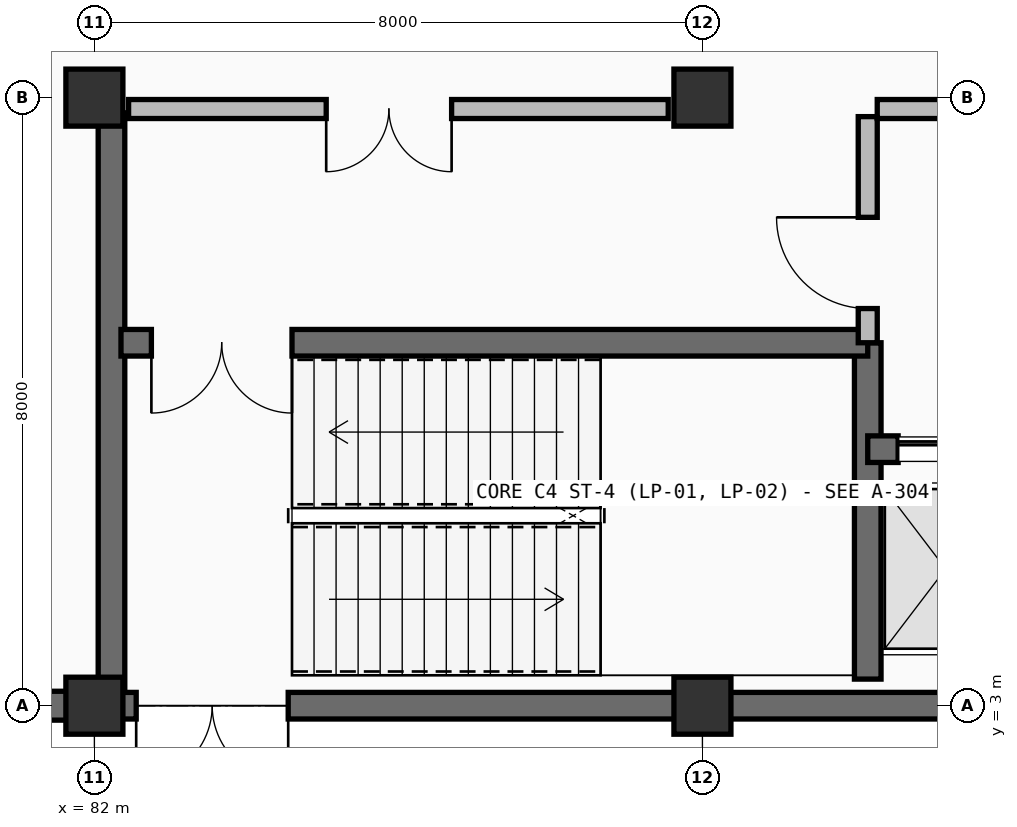
"""IFC4 building model, lengths in metres.
Left out: names, types, materials, properties, quantities, classifications, styles, units other than length and angle.
Written with IfcOpenShell. Run it as: python <this file> out.ifc"""

import sys

from ifc_helpers import new_model, si_unit, direction, frame, frame_2d, origin, origin_2d, place, context, subcontext, project, spatial, rectangle, extrude, element, fill, save


model = new_model("IFC4")
c1 = context("Model", 3, precision=1e-05, world=origin(), true_north=direction((0.0, 1.0)))
c2 = subcontext(c1, "Body", "Model", "MODEL_VIEW")
j1 = project(units=[si_unit("LENGTHUNIT", "METRE"), si_unit("PLANEANGLEUNIT", "RADIAN")], contexts=[c1])
p1 = place(None, origin())
s1 = spatial("IfcSite", under=j1, at=p1, CompositionType="ELEMENT")
p2 = place(p1, origin())
s2 = spatial("IfcBuilding", under=s1, at=p2, CompositionType="ELEMENT")
p3 = place(p2, origin())
s3 = spatial("IfcBuildingStorey", under=s2, at=p3, CompositionType="ELEMENT", Elevation=0.0)
for number, where, z_axis, x_axis in (
    (1, (82.0, 3.0, 0.0), (0.0, 0.0, 1.0), (1.0, 0.0, 0.0)),
    (2, (82.0, 11.0, 0.0), (0.0, 0.0, 1.0), (1.0, 0.0, 0.0)),
    (3, (90.0, 3.0, 0.0), (0.0, 0.0, 1.0), (1.0, 0.0, 0.0)),
    (4, (90.0, 11.0, 0.0), (0.0, 0.0, 1.0), (1.0, 0.0, 0.0)),
):
    element("IfcColumn", number, at=place(p3, frame(where, z_axis=z_axis, x_axis=x_axis)), inside=s3, PredefinedType="COLUMN", context=c2, shape_type="SweptSolid", body=[
        extrude(rectangle(XDim=0.75, YDim=0.75, at=origin_2d()), origin(), (0.0, 0.0, 1.0), 5.4),
    ])
p4 = place(p3, frame((98.0, 3.0, 0.0), z_axis=(0.0, 0.0, 1.0), x_axis=(-1.0, 0.0, 0.0)))
e5 = element("IfcWall", 5, at=p4, inside=s3, PredefinedType="SHEAR", context=c2, shape_type="SweptSolid", body=[
    extrude(rectangle(XDim=8.0, YDim=0.35, at=frame_2d((4.0, 0.0))), origin(), (0.0, 0.0, 1.0), 5.4),
])
p5 = place(p3, frame((90.0, 3.0, 0.0), z_axis=(0.0, 0.0, 1.0), x_axis=(-1.0, 0.0, 0.0)))
e6 = element("IfcWall", 6, at=p5, inside=s3, PredefinedType="SHEAR", context=c2, shape_type="SweptSolid", body=[
    extrude(rectangle(XDim=8.0, YDim=0.35, at=frame_2d((4.0, 0.0))), origin(), (0.0, 0.0, 1.0), 5.4),
])
p6 = place(p5, frame((5.45, 0.0, 0.0)))
e7 = element("IfcOpeningElement", 7, at=p6, cuts=e6, PredefinedType="OPENING", context=c2, shape_type="SweptSolid", body=[
    extrude(rectangle(XDim=2.0, YDim=2.6, at=frame_2d((1.0, 1.3))), frame((0.0, 0.185, 0.0), z_axis=(0.0, -1.0, 0.0), x_axis=(1.0, 0.0, 0.0)), (0.0, 0.0, 1.0), 0.37),
])
p7 = place(p3, frame((82.0, 3.0, 0.0), z_axis=(0.0, 0.0, 1.0), x_axis=(-1.0, 0.0, 0.0)))
e8 = element("IfcWall", 8, at=p7, inside=s3, PredefinedType="SOLIDWALL", context=c2, shape_type="SweptSolid", body=[
    extrude(rectangle(XDim=7.0, YDim=0.38, at=frame_2d((3.5, 0.0))), origin(), (0.0, 0.0, 1.0), 5.4),
])
p8 = place(p7, frame((2.4, 0.0, 0.0)))
e9 = element("IfcOpeningElement", 9, at=p8, cuts=e8, PredefinedType="OPENING", context=c2, shape_type="SweptSolid", body=[
    extrude(rectangle(XDim=2.2, YDim=2.8, at=frame_2d((1.1, 1.4))), frame((0.0, 0.2, 0.0), z_axis=(0.0, -1.0, 0.0), x_axis=(1.0, 0.0, 0.0)), (0.0, 0.0, 1.0), 0.4),
])
p9 = place(p3, frame((82.225, 3.2, 0.0), z_axis=(0.0, 0.0, 1.0), x_axis=(0.0, 1.0, 0.0)))
e10 = element("IfcWall", 10, at=p9, inside=s3, PredefinedType="SHEAR", context=c2, shape_type="SweptSolid", body=[
    extrude(rectangle(XDim=7.6, YDim=0.35, at=frame_2d((3.8, 0.0))), origin(), (0.0, 0.0, 1.0), 5.1),
])
p10 = place(p3, frame((92.175, 3.35, 0.0), z_axis=(0.0, 0.0, 1.0), x_axis=(0.0, 1.0, 0.0)))
e11 = element("IfcWall", 11, at=p10, inside=s3, PredefinedType="SHEAR", context=c2, shape_type="SweptSolid", body=[
    extrude(rectangle(XDim=4.425, YDim=0.35, at=frame_2d((2.212, 0.0))), origin(), (0.0, 0.0, 1.0), 5.1),
])
p11 = place(p3, frame((82.35, 7.775, 0.0), z_axis=(0.0, 0.0, 1.0), x_axis=(1.0, 0.0, 0.0)))
e12 = element("IfcWall", 12, at=p11, inside=s3, PredefinedType="SHEAR", context=c2, shape_type="SweptSolid", body=[
    extrude(rectangle(XDim=9.825, YDim=0.35, at=frame_2d((4.913, 0.0))), origin(), (0.0, 0.0, 1.0), 5.1),
])
p12 = place(p11, frame((0.4, 0.0, 0.0)))
e13 = element("IfcOpeningElement", 13, at=p12, cuts=e12, PredefinedType="OPENING", context=c2, shape_type="SweptSolid", body=[
    extrude(rectangle(XDim=1.85, YDim=2.25, at=frame_2d((0.925, 1.125))), frame((0.0, 0.185, 0.0), z_axis=(0.0, -1.0, 0.0), x_axis=(1.0, 0.0, 0.0)), (0.0, 0.0, 1.0), 0.37),
])
p13 = place(p3, frame((92.175, 6.375, 0.0), z_axis=(0.0, 0.0, 1.0), x_axis=(1.0, 0.0, 0.0)))
e14 = element("IfcWall", 14, at=p13, inside=s3, PredefinedType="SHEAR", context=c2, shape_type="SweptSolid", body=[
    extrude(rectangle(XDim=5.475, YDim=0.35, at=frame_2d((2.737, 0.0))), origin(), (0.0, 0.0, 1.0), 5.1),
])
p14 = place(p13, frame((0.4, 0.0, 0.0)))
e15 = element("IfcOpeningElement", 15, at=p14, cuts=e14, PredefinedType="OPENING", context=c2, shape_type="SweptSolid", body=[
    extrude(rectangle(XDim=1.25, YDim=2.25, at=frame_2d((0.625, 1.125))), frame((0.0, 0.185, 0.0), z_axis=(0.0, -1.0, 0.0), x_axis=(1.0, 0.0, 0.0)), (0.0, 0.0, 1.0), 0.37),
])
p15 = place(p13, frame((3.275, 0.0, 0.0)))
e16 = element("IfcOpeningElement", 16, at=p15, cuts=e14, PredefinedType="OPENING", context=c2, shape_type="SweptSolid", body=[
    extrude(rectangle(XDim=1.1, YDim=2.2, at=frame_2d((0.55, 1.1))), frame((0.0, 0.185, 0.0), z_axis=(0.0, -1.0, 0.0), x_axis=(1.0, 0.0, 0.0)), (0.0, 0.0, 1.0), 0.37),
])
p16 = place(p3, frame((92.175, 7.775, 0.0), z_axis=(0.0, 0.0, 1.0), x_axis=(0.0, 1.0, 0.0)))
e17 = element("IfcWall", 17, at=p16, inside=s3, PredefinedType="PARTITIONING", context=c2, shape_type="SweptSolid", body=[
    extrude(rectangle(XDim=2.975, YDim=0.25, at=frame_2d((1.488, 0.0))), origin(), (0.0, 0.0, 1.0), 5.1),
])
p17 = place(p16, frame((0.45, 0.0, 0.0)))
e18 = element("IfcOpeningElement", 18, at=p17, cuts=e17, PredefinedType="OPENING", context=c2, shape_type="SweptSolid", body=[
    extrude(rectangle(XDim=1.2, YDim=2.2, at=frame_2d((0.6, 1.1))), frame((0.0, 0.135, 0.0), z_axis=(0.0, -1.0, 0.0), x_axis=(1.0, 0.0, 0.0)), (0.0, 0.0, 1.0), 0.27),
])
p18 = place(p3, frame((82.45, 10.85, 0.0), z_axis=(0.0, 0.0, 1.0), x_axis=(1.0, 0.0, 0.0)))
e19 = element("IfcWall", 19, at=p18, inside=s3, PredefinedType="PARTITIONING", context=c2, shape_type="SweptSolid", body=[
    extrude(rectangle(XDim=7.1, YDim=0.25, at=frame_2d((3.55, 0.0))), origin(), (0.0, 0.0, 1.0), 4.335),
])
p19 = place(p18, frame((2.6, 0.0, 0.0)))
e20 = element("IfcOpeningElement", 20, at=p19, cuts=e19, PredefinedType="OPENING", context=c2, shape_type="SweptSolid", body=[
    extrude(rectangle(XDim=1.65, YDim=2.25, at=frame_2d((0.825, 1.125))), frame((0.0, 0.135, 0.0), z_axis=(0.0, -1.0, 0.0), x_axis=(1.0, 0.0, 0.0)), (0.0, 0.0, 1.0), 0.27),
])
p20 = place(p3, frame((92.3, 10.85, 0.0), z_axis=(0.0, 0.0, 1.0), x_axis=(1.0, 0.0, 0.0)))
e21 = element("IfcWall", 21, at=p20, inside=s3, PredefinedType="PARTITIONING", context=c2, shape_type="SweptSolid", body=[
    extrude(rectangle(XDim=5.25, YDim=0.25, at=frame_2d((2.625, 0.0))), origin(), (0.0, 0.0, 1.0), 4.335),
])
p21 = place(p20, frame((1.85, 0.0, 0.0)))
e22 = element("IfcOpeningElement", 22, at=p21, cuts=e21, PredefinedType="OPENING", context=c2, shape_type="SweptSolid", body=[
    extrude(rectangle(XDim=1.5, YDim=2.2, at=frame_2d((0.75, 1.1))), frame((0.0, 0.135, 0.0), z_axis=(0.0, -1.0, 0.0), x_axis=(1.0, 0.0, 0.0)), (0.0, 0.0, 1.0), 0.27),
])
p22 = place(p6, origin())
e23 = element("IfcDoor", 23, at=p22, inside=s3, OperationType="DOUBLE_DOOR_SINGLE_SWING", PredefinedType="DOOR", context=c2, shape_type="SweptSolid", body=[
    extrude(rectangle(XDim=2.0, YDim=2.6, at=frame_2d((1.0, 1.3))), frame((0.0, 0.025, 0.0), z_axis=(0.0, -1.0, 0.0), x_axis=(1.0, 0.0, 0.0)), (0.0, 0.0, 1.0), 0.05),
])
fill(e7, e23)
p23 = place(p12, frame((1.85, 0.0, 0.0), z_axis=(0.0, 0.0, 1.0), x_axis=(-1.0, 0.0, 0.0)))
e24 = element("IfcDoor", 24, at=p23, inside=s3, OperationType="DOUBLE_DOOR_SINGLE_SWING", PredefinedType="DOOR", context=c2, shape_type="SweptSolid", body=[
    extrude(rectangle(XDim=1.85, YDim=2.25, at=frame_2d((0.925, 1.125))), frame((0.0, 0.025, 0.0), z_axis=(0.0, -1.0, 0.0), x_axis=(1.0, 0.0, 0.0)), (0.0, 0.0, 1.0), 0.05),
])
fill(e13, e24)
p24 = place(p14, origin())
e25 = element("IfcDoor", 25, at=p24, inside=s3, OperationType="DOUBLE_DOOR_SLIDING", PredefinedType="DOOR", context=c2, shape_type="SweptSolid", body=[
    extrude(rectangle(XDim=1.25, YDim=2.25, at=frame_2d((0.625, 1.125))), frame((0.0, 0.025, 0.0), z_axis=(0.0, -1.0, 0.0), x_axis=(1.0, 0.0, 0.0)), (0.0, 0.0, 1.0), 0.05),
])
fill(e15, e25)
p25 = place(p17, origin())
e26 = element("IfcDoor", 26, at=p25, inside=s3, OperationType="SINGLE_SWING_RIGHT", PredefinedType="DOOR", context=c2, shape_type="SweptSolid", body=[
    extrude(rectangle(XDim=1.2, YDim=2.2, at=frame_2d((0.6, 1.1))), frame((0.0, 0.025, 0.0), z_axis=(0.0, -1.0, 0.0), x_axis=(1.0, 0.0, 0.0)), (0.0, 0.0, 1.0), 0.05),
])
fill(e18, e26)
p26 = place(p19, frame((1.65, 0.0, 0.0), z_axis=(0.0, 0.0, 1.0), x_axis=(-1.0, 0.0, 0.0)))
e27 = element("IfcDoor", 27, at=p26, inside=s3, OperationType="DOUBLE_DOOR_SINGLE_SWING", PredefinedType="DOOR", context=c2, shape_type="SweptSolid", body=[
    extrude(rectangle(XDim=1.65, YDim=2.25, at=frame_2d((0.825, 1.125))), frame((0.0, 0.025, 0.0), z_axis=(0.0, -1.0, 0.0), x_axis=(1.0, 0.0, 0.0)), (0.0, 0.0, 1.0), 0.05),
])
fill(e20, e27)
save(model, sys.argv[1])
